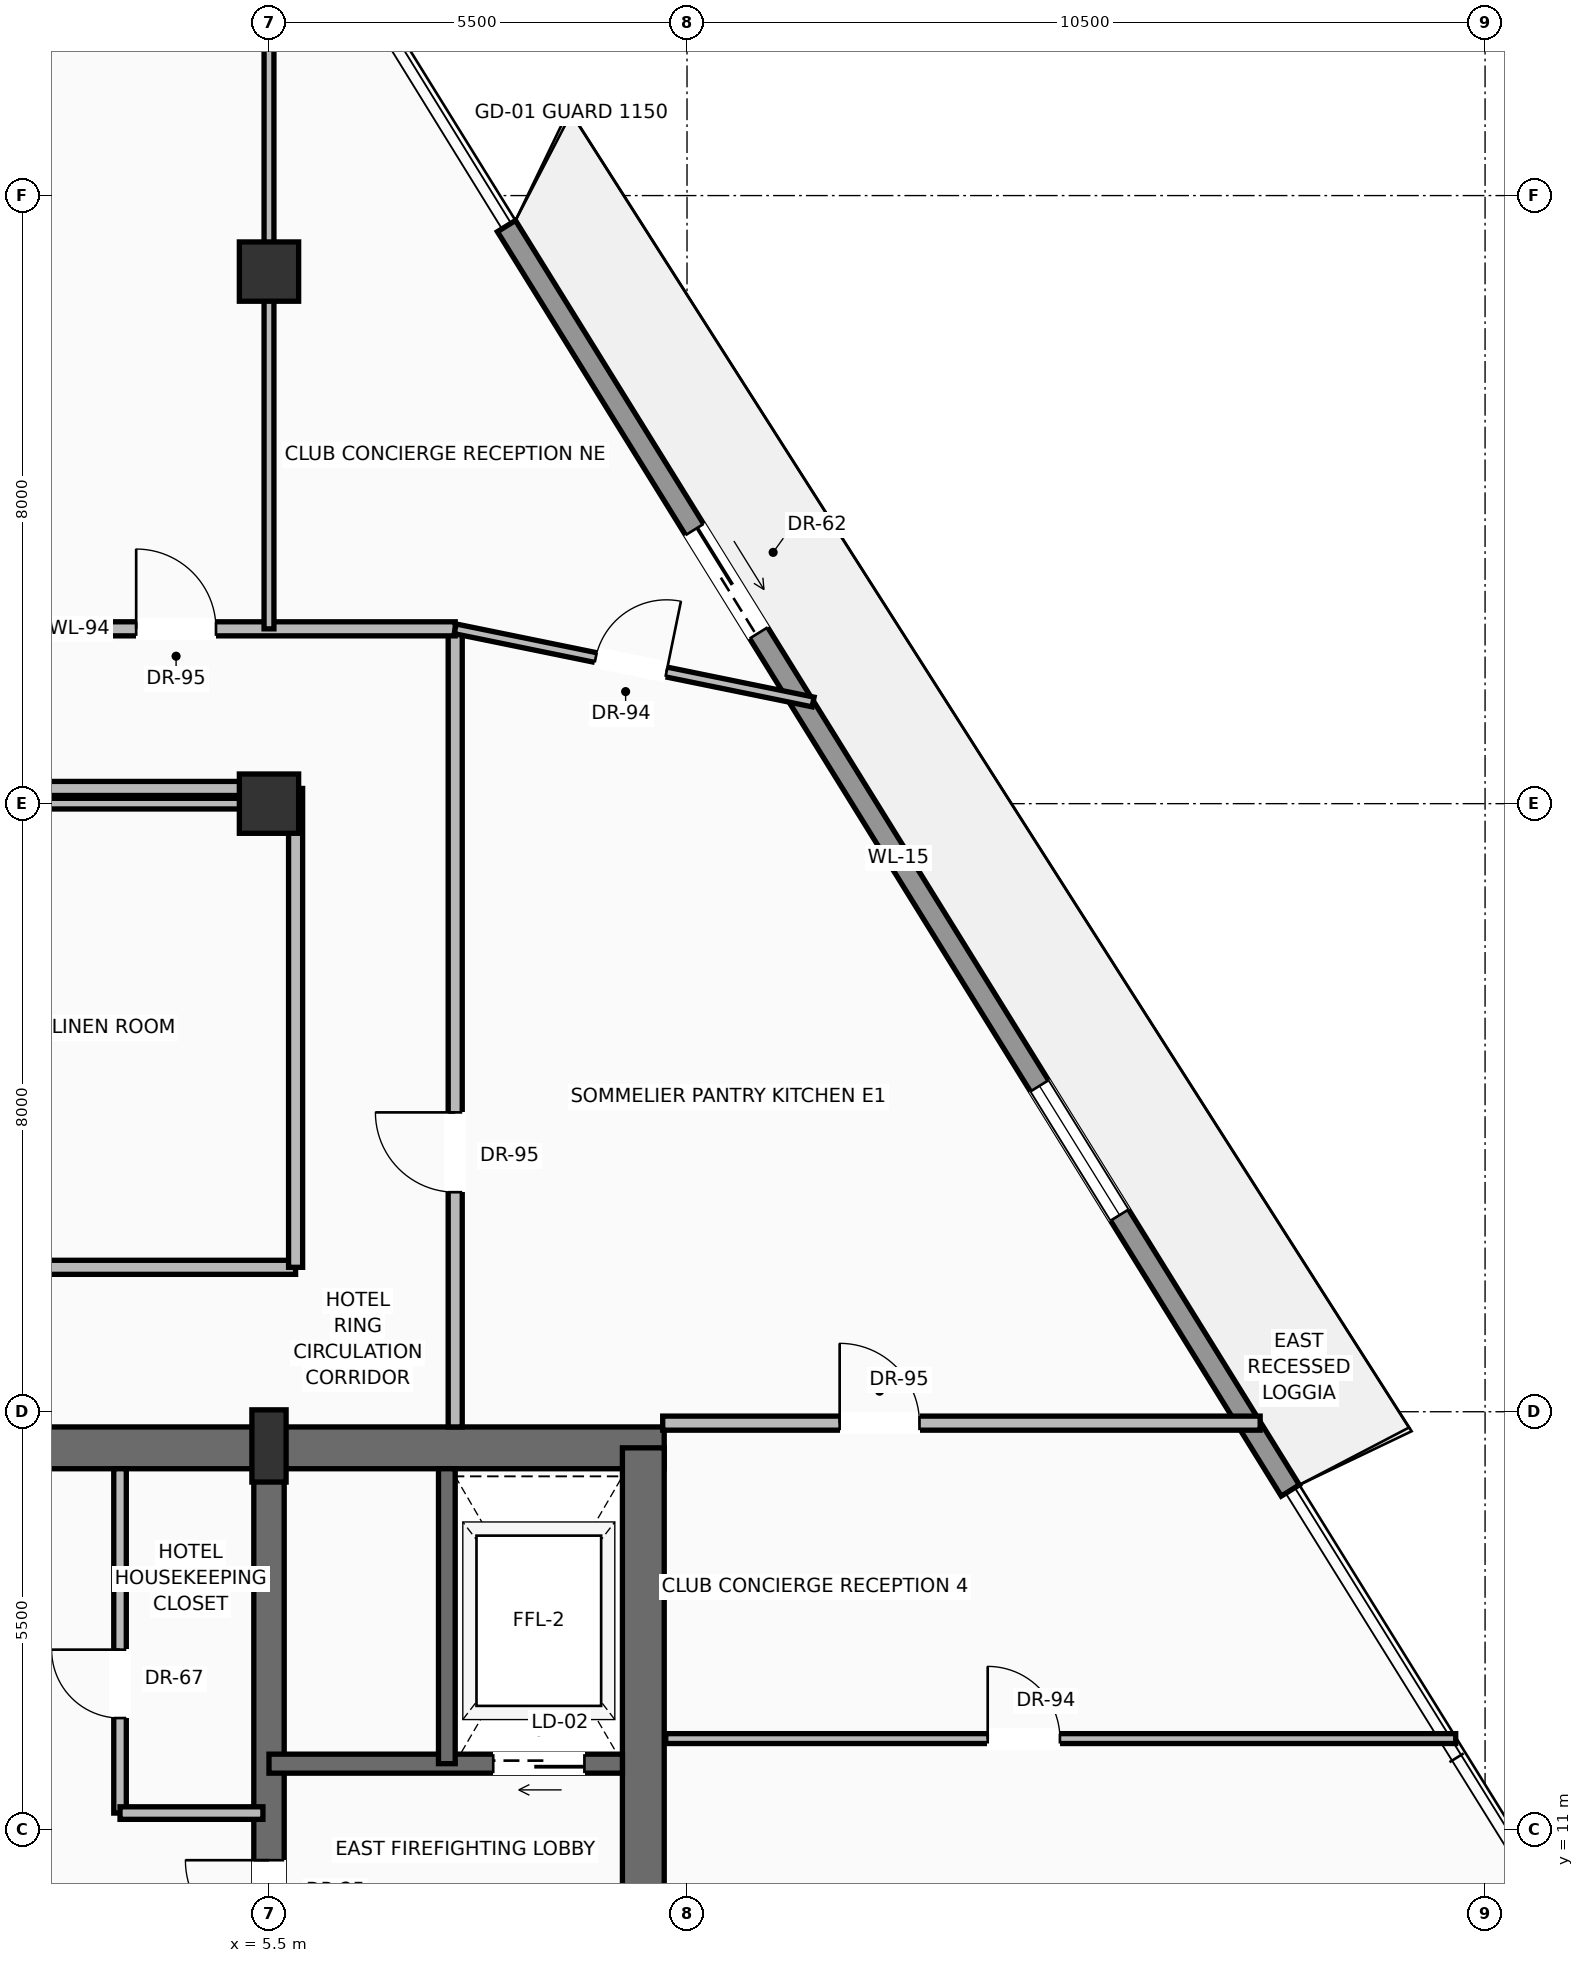
"""IFC4 building model, lengths in metres.
Left out: names, types, materials, properties, quantities, classifications, styles, units other than length and angle.
Written with IfcOpenShell. Run it as: python <this file> out.ifc"""

import sys

from ifc_helpers import new_model, si_unit, direction, frame, frame_2d, origin, origin_2d, place, context, subcontext, project, spatial, rectangle, extrude, source, transform, mapped, element, fill, save


model = new_model("IFC4")
c1 = context("Model", 3, precision=1e-05, world=origin(), true_north=direction((0.0, 1.0)))
c2 = subcontext(c1, "Body", "Model", "MODEL_VIEW")
j1 = project(units=[si_unit("LENGTHUNIT", "METRE"), si_unit("PLANEANGLEUNIT", "RADIAN")], contexts=[c1])
p1 = place(None, origin())
s1 = spatial("IfcSite", under=j1, at=p1, CompositionType="ELEMENT")
p2 = place(p1, origin())
s2 = spatial("IfcBuilding", under=s1, at=p2, CompositionType="ELEMENT")
p3 = place(p2, frame((0.0, 0.0, 233.8)))
s3 = spatial("IfcBuildingStorey", under=s2, at=p3, CompositionType="ELEMENT", Elevation=233.8)
p4 = place(p3, frame((-10.7, 16.025, 0.0), z_axis=(0.0, 0.0, 1.0), x_axis=(1.0, 0.0, 0.0)))
e1 = element("IfcWall", 1, at=p4, inside=s3, PredefinedType="SHEAR", context=c2, shape_type="SweptSolid", body=[
    extrude(rectangle(XDim=21.4, YDim=0.55, at=frame_2d((10.7, 0.0))), origin(), (0.0, 0.0, 1.0), 3.24),
])
p5 = place(p4, frame((3.27, 0.0, 0.0)))
e2 = element("IfcOpeningElement", 2, at=p5, cuts=e1, PredefinedType="OPENING", context=c2, shape_type="SweptSolid", body=[
    extrude(rectangle(XDim=1.3, YDim=2.3, at=frame_2d((0.65, 1.15))), frame((0.0, 0.285, 0.0), z_axis=(0.0, -1.0, 0.0), x_axis=(1.0, 0.0, 0.0)), (0.0, 0.0, 1.0), 0.57),
])
p6 = place(p4, frame((9.7, 0.0, 0.0)))
e3 = element("IfcOpeningElement", 3, at=p6, cuts=e1, PredefinedType="OPENING", context=c2, shape_type="SweptSolid", body=[
    extrude(rectangle(XDim=2.0, YDim=2.4, at=frame_2d((1.0, 1.2))), frame((0.0, 0.285, 0.0), z_axis=(0.0, -1.0, 0.0), x_axis=(1.0, 0.0, 0.0)), (0.0, 0.0, 1.0), 0.57),
])
p7 = place(p3, frame((10.425, 0.575, 0.0), z_axis=(0.0, 0.0, 1.0), x_axis=(0.0, 1.0, 0.0)))
e4 = element("IfcWall", 4, at=p7, inside=s3, PredefinedType="SHEAR", context=c2, shape_type="SweptSolid", body=[
    extrude(rectangle(XDim=15.45, YDim=0.55, at=frame_2d((7.725, 0.0))), origin(), (0.0, 0.0, 1.0), 3.24),
])
p8 = place(p3, frame((5.5, 0.575, 0.0), z_axis=(0.0, 0.0, 1.0), x_axis=(0.0, 1.0, 0.0)))
e5 = element("IfcWall", 5, at=p8, inside=s3, PredefinedType="SHEAR", context=c2, shape_type="SweptSolid", body=[
    extrude(rectangle(XDim=15.45, YDim=0.4, at=frame_2d((7.725, 0.0))), origin(), (0.0, 0.0, 1.0), 3.24),
])
p9 = place(p8, frame((8.925, 0.0, 0.0)))
e6 = element("IfcOpeningElement", 6, at=p9, cuts=e5, PredefinedType="OPENING", context=c2, shape_type="SweptSolid", body=[
    extrude(rectangle(XDim=1.1, YDim=2.2, at=frame_2d((0.55, 1.1))), frame((0.0, 0.21, 0.0), z_axis=(0.0, -1.0, 0.0), x_axis=(1.0, 0.0, 0.0)), (0.0, 0.0, 1.0), 0.42),
])
m1 = source(origin(), c2, "Body", "SweptSolid", [
    extrude(rectangle(XDim=0.45, YDim=0.95, at=origin_2d()), origin(), (0.0, 0.0, 1.0), 3.45),
])
p10 = place(p3, frame((5.5, 16.05, 0.0), z_axis=(0.0, 0.0, 1.0), x_axis=(1.0, 0.0, 0.0)))
e7 = element("IfcColumn", 7, at=p10, inside=s3, PredefinedType="PILASTER", context=c2, shape_type="MappedRepresentation", body=[
    mapped(m1, transform((0.0, 0.0, 0.0), scale=1.0)),
])
m2 = source(origin(), c2, "Body", "SweptSolid", [
    extrude(rectangle(XDim=0.78, YDim=0.78, at=origin_2d()), origin(), (0.0, 0.0, 1.0), 3.45),
])
for number, where, z_axis, x_axis in (
    (8, (5.5, 24.5, 0.0), (0.0, 0.0, 1.0), (1.0, 0.0, 0.0)),
    (9, (5.5, 31.5, 0.0), (0.0, 0.0, 1.0), (1.0, 0.0, 0.0)),
):
    element("IfcColumn", number, at=place(p3, frame(where, z_axis=z_axis, x_axis=x_axis)), inside=s3, PredefinedType="COLUMN", context=c2, shape_type="MappedRepresentation", body=[
        mapped(m2, transform((0.0, 0.0, 0.0), scale=1.0)),
    ])
p11 = place(p3, frame((8.625, 32.099, 0.0), z_axis=(0.0, 0.0, 1.0), x_axis=(0.526909754256, -0.849921238039, 0.0)))
e10 = element("IfcWall", 10, at=p11, inside=s3, PredefinedType="SOLIDWALL", context=c2, shape_type="SweptSolid", body=[
    extrude(rectangle(XDim=19.572, YDim=0.28, at=frame_2d((9.786, 0.0))), origin(), (0.0, 0.0, 1.0), 2.82),
])
p12 = place(p11, frame((4.697, 0.0, 0.0)))
e11 = element("IfcOpeningElement", 11, at=p12, cuts=e10, PredefinedType="OPENING", context=c2, shape_type="SweptSolid", body=[
    extrude(rectangle(XDim=1.6, YDim=2.35, at=frame_2d((0.8, 1.175))), frame((0.0, 0.15, 0.0), z_axis=(0.0, -1.0, 0.0), x_axis=(1.0, 0.0, 0.0)), (0.0, 0.0, 1.0), 0.3),
])
p13 = place(p11, frame((13.309, 0.0, 0.9)))
e12 = element("IfcOpeningElement", 12, at=p13, cuts=e10, PredefinedType="OPENING", context=c2, shape_type="SweptSolid", body=[
    extrude(rectangle(XDim=2.0, YDim=1.75, at=frame_2d((1.0, 0.875))), frame((0.0, 0.15, 0.0), z_axis=(0.0, -1.0, 0.0), x_axis=(1.0, 0.0, 0.0)), (0.0, 0.0, 1.0), 0.3),
])
p14 = place(p3, frame((10.15, 11.87, 0.0), z_axis=(0.0, 0.0, 1.0), x_axis=(-1.0, 0.0, 0.0)))
e13 = element("IfcWall", 13, at=p14, inside=s3, PredefinedType="SOLIDWALL", context=c2, shape_type="SweptSolid", body=[
    extrude(rectangle(XDim=4.65, YDim=0.25, at=frame_2d((2.325, 0.0))), origin(), (0.0, 0.0, 1.0), 3.24),
])
p15 = place(p14, frame((0.5, 0.0, 0.0)))
e14 = element("IfcOpeningElement", 14, at=p15, cuts=e13, PredefinedType="OPENING", context=c2, shape_type="SweptSolid", body=[
    extrude(rectangle(XDim=1.2, YDim=2.25, at=frame_2d((0.6, 1.125))), frame((0.0, 0.135, 0.0), z_axis=(0.0, -1.0, 0.0), x_axis=(1.0, 0.0, 0.0)), (0.0, 0.0, 1.0), 0.27),
])
p16 = place(p3, frame((7.84, 11.87, 0.0), z_axis=(0.0, 0.0, 1.0), x_axis=(0.0, 1.0, 0.0)))
e15 = element("IfcWall", 15, at=p16, inside=s3, PredefinedType="SOLIDWALL", context=c2, shape_type="SweptSolid", body=[
    extrude(rectangle(XDim=3.88, YDim=0.22, at=frame_2d((1.94, 0.0))), origin(), (0.0, 0.0, 1.0), 3.24),
])
p17 = place(p3, frame((3.54, 11.22, 0.0), z_axis=(0.0, 0.0, 1.0), x_axis=(0.0, 1.0, 0.0)))
e16 = element("IfcWall", 16, at=p17, inside=s3, PredefinedType="PARTITIONING", context=c2, shape_type="SweptSolid", body=[
    extrude(rectangle(XDim=4.53, YDim=0.165, at=frame_2d((2.265, 0.0))), origin(), (0.0, 0.0, 1.0), 3.232),
])
p18 = place(p17, frame((1.25, 0.0, 0.0)))
e17 = element("IfcOpeningElement", 17, at=p18, cuts=e16, PredefinedType="OPENING", context=c2, shape_type="SweptSolid", body=[
    extrude(rectangle(XDim=0.9, YDim=2.1, at=frame_2d((0.45, 1.05))), frame((0.0, 0.093, 0.0), z_axis=(0.0, -1.0, 0.0), x_axis=(1.0, 0.0, 0.0)), (0.0, 0.0, 1.0), 0.185),
])
p19 = place(p3, frame((3.54, 11.22, 0.0), z_axis=(0.0, 0.0, 1.0), x_axis=(1.0, 0.0, 0.0)))
e18 = element("IfcWall", 18, at=p19, inside=s3, PredefinedType="PARTITIONING", context=c2, shape_type="SweptSolid", body=[
    extrude(rectangle(XDim=1.88, YDim=0.165, at=frame_2d((0.94, 0.0))), origin(), (0.0, 0.0, 1.0), 3.232),
])
p20 = place(p3, frame((-6.55, 18.4, 0.0), z_axis=(0.0, 0.0, 1.0), x_axis=(1.0, 0.0, 0.0)))
e19 = element("IfcWall", 19, at=p20, inside=s3, PredefinedType="PARTITIONING", context=c2, shape_type="SweptSolid", body=[
    extrude(rectangle(XDim=12.4, YDim=0.185, at=frame_2d((6.2, 0.0))), origin(), (0.0, 0.0, 1.0), 3.232),
])
p21 = place(p20, frame((5.725, 0.0, 0.0)))
e20 = element("IfcOpeningElement", 20, at=p21, cuts=e19, PredefinedType="OPENING", context=c2, shape_type="SweptSolid", body=[
    extrude(rectangle(XDim=0.95, YDim=2.2, at=frame_2d((0.475, 1.1))), frame((0.0, 0.103, 0.0), z_axis=(0.0, -1.0, 0.0), x_axis=(1.0, 0.0, 0.0)), (0.0, 0.0, 1.0), 0.205),
])
p22 = place(p3, frame((-6.55, 24.7, 0.0), z_axis=(0.0, 0.0, 1.0), x_axis=(1.0, 0.0, 0.0)))
e21 = element("IfcWall", 21, at=p22, inside=s3, PredefinedType="PARTITIONING", context=c2, shape_type="SweptSolid", body=[
    extrude(rectangle(XDim=12.4, YDim=0.185, at=frame_2d((6.2, 0.0))), origin(), (0.0, 0.0, 1.0), 2.683),
])
p23 = place(p3, frame((5.85, 18.4, 0.0), z_axis=(0.0, 0.0, 1.0), x_axis=(0.0, 1.0, 0.0)))
e22 = element("IfcWall", 22, at=p23, inside=s3, PredefinedType="PARTITIONING", context=c2, shape_type="SweptSolid", body=[
    extrude(rectangle(XDim=6.3, YDim=0.185, at=frame_2d((3.15, 0.0))), origin(), (0.0, 0.0, 1.0), 3.232),
])
p24 = place(p3, frame((7.95, 16.3, 0.0), z_axis=(0.0, 0.0, 1.0), x_axis=(0.0, 1.0, 0.0)))
e23 = element("IfcWall", 23, at=p24, inside=s3, PredefinedType="PARTITIONING", context=c2, shape_type="SweptSolid", body=[
    extrude(rectangle(XDim=10.5, YDim=0.185, at=frame_2d((5.25, 0.0))), origin(), (0.0, 0.0, 1.0), 3.232),
])
p25 = place(p24, frame((3.088, 0.0, 0.0)))
e24 = element("IfcOpeningElement", 24, at=p25, cuts=e23, PredefinedType="OPENING", context=c2, shape_type="SweptSolid", body=[
    extrude(rectangle(XDim=1.05, YDim=2.25, at=frame_2d((0.525, 1.125))), frame((0.0, 0.103, 0.0), z_axis=(0.0, -1.0, 0.0), x_axis=(1.0, 0.0, 0.0)), (0.0, 0.0, 1.0), 0.205),
])
p26 = place(p3, frame((-8.65, 26.8, 0.0), z_axis=(0.0, 0.0, 1.0), x_axis=(1.0, 0.0, 0.0)))
e25 = element("IfcWall", 25, at=p26, inside=s3, PredefinedType="PARTITIONING", context=c2, shape_type="SweptSolid", body=[
    extrude(rectangle(XDim=16.6, YDim=0.185, at=frame_2d((8.3, 0.0))), origin(), (0.0, 0.0, 1.0), 3.232),
])
p27 = place(p26, frame((3.847, 0.0, 0.0)))
e26 = element("IfcOpeningElement", 26, at=p27, cuts=e25, PredefinedType="OPENING", context=c2, shape_type="SweptSolid", body=[
    extrude(rectangle(XDim=1.05, YDim=2.25, at=frame_2d((0.525, 1.125))), frame((0.0, 0.103, 0.0), z_axis=(0.0, -1.0, 0.0), x_axis=(1.0, 0.0, 0.0)), (0.0, 0.0, 1.0), 0.205),
])
p28 = place(p26, frame((6.903, 0.0, 0.0)))
e27 = element("IfcOpeningElement", 27, at=p28, cuts=e25, PredefinedType="OPENING", context=c2, shape_type="SweptSolid", body=[
    extrude(rectangle(XDim=1.05, YDim=2.25, at=frame_2d((0.525, 1.125))), frame((0.0, 0.103, 0.0), z_axis=(0.0, -1.0, 0.0), x_axis=(1.0, 0.0, 0.0)), (0.0, 0.0, 1.0), 0.205),
])
p29 = place(p26, frame((12.403, 0.0, 0.0)))
e28 = element("IfcOpeningElement", 28, at=p29, cuts=e25, PredefinedType="OPENING", context=c2, shape_type="SweptSolid", body=[
    extrude(rectangle(XDim=1.05, YDim=2.25, at=frame_2d((0.525, 1.125))), frame((0.0, 0.103, 0.0), z_axis=(0.0, -1.0, 0.0), x_axis=(1.0, 0.0, 0.0)), (0.0, 0.0, 1.0), 0.205),
])
p30 = place(p26, frame((1.403, 0.0, 0.0)))
e29 = element("IfcOpeningElement", 29, at=p30, cuts=e25, PredefinedType="OPENING", context=c2, shape_type="SweptSolid", body=[
    extrude(rectangle(XDim=1.05, YDim=2.25, at=frame_2d((0.525, 1.125))), frame((0.0, 0.103, 0.0), z_axis=(0.0, -1.0, 0.0), x_axis=(1.0, 0.0, 0.0)), (0.0, 0.0, 1.0), 0.205),
])
p31 = place(p3, frame((-6.55, 24.5, 0.0), z_axis=(0.0, 0.0, 1.0), x_axis=(1.0, 0.0, 0.0)))
e30 = element("IfcWall", 30, at=p31, inside=s3, PredefinedType="PARTITIONING", context=c2, shape_type="SweptSolid", body=[
    extrude(rectangle(XDim=12.4, YDim=0.14, at=frame_2d((6.2, 0.0))), origin(), (0.0, 0.0, 1.0), 2.683),
])
p32 = place(p3, frame((10.68, 16.35, 0.0), z_axis=(0.0, 0.0, 1.0), x_axis=(1.0, 0.0, 0.0)))
e31 = element("IfcWall", 31, at=p32, inside=s3, PredefinedType="PARTITIONING", context=c2, shape_type="SweptSolid", body=[
    extrude(rectangle(XDim=7.861, YDim=0.185, at=frame_2d((3.93, 0.0))), origin(), (0.0, 0.0, 1.0), 3.232),
])
p33 = place(p32, frame((2.328, 0.0, 0.0)))
e32 = element("IfcOpeningElement", 32, at=p33, cuts=e31, PredefinedType="OPENING", context=c2, shape_type="SweptSolid", body=[
    extrude(rectangle(XDim=1.05, YDim=2.25, at=frame_2d((0.525, 1.125))), frame((0.0, 0.103, 0.0), z_axis=(0.0, -1.0, 0.0), x_axis=(1.0, 0.0, 0.0)), (0.0, 0.0, 1.0), 0.205),
])
p34 = place(p3, frame((7.95, 26.8, 0.0), z_axis=(0.0, 0.0, 1.0), x_axis=(0.979737591197, -0.200285427317, 0.0)))
e33 = element("IfcWall", 33, at=p34, inside=s3, PredefinedType="PARTITIONING", context=c2, shape_type="SweptSolid", body=[
    extrude(rectangle(XDim=4.806, YDim=0.13, at=frame_2d((2.403, 0.0))), origin(), (0.0, 0.0, 1.0), 3.232),
])
p35 = place(p34, frame((1.887, 0.0, 0.0)))
e34 = element("IfcOpeningElement", 34, at=p35, cuts=e33, PredefinedType="OPENING", context=c2, shape_type="SweptSolid", body=[
    extrude(rectangle(XDim=0.95, YDim=2.2, at=frame_2d((0.475, 1.1))), frame((0.0, 0.075, 0.0), z_axis=(0.0, -1.0, 0.0), x_axis=(1.0, 0.0, 0.0)), (0.0, 0.0, 1.0), 0.15),
])
p36 = place(p3, frame((5.5, 26.8, 0.0), z_axis=(0.0, 0.0, 1.0), x_axis=(0.0, 1.0, 0.0)))
e35 = element("IfcWall", 35, at=p36, inside=s3, PredefinedType="PARTITIONING", context=c2, shape_type="SweptSolid", body=[
    extrude(rectangle(XDim=10.585, YDim=0.13, at=frame_2d((5.292, 0.0))), origin(), (0.0, 0.0, 1.0), 2.683),
])
p37 = place(p3, frame((10.72, 12.2, 0.0), z_axis=(0.0, 0.0, 1.0), x_axis=(1.0, 0.0, 0.0)))
e36 = element("IfcWall", 36, at=p37, inside=s3, PredefinedType="PARTITIONING", context=c2, shape_type="SweptSolid", body=[
    extrude(rectangle(XDim=10.394, YDim=0.13, at=frame_2d((5.197, 0.0))), origin(), (0.0, 0.0, 1.0), 3.232),
])
p38 = place(p37, frame((4.236, 0.0, 0.0)))
e37 = element("IfcOpeningElement", 37, at=p38, cuts=e36, PredefinedType="OPENING", context=c2, shape_type="SweptSolid", body=[
    extrude(rectangle(XDim=0.95, YDim=2.2, at=frame_2d((0.475, 1.1))), frame((0.0, 0.075, 0.0), z_axis=(0.0, -1.0, 0.0), x_axis=(1.0, 0.0, 0.0)), (0.0, 0.0, 1.0), 0.15),
])
m3 = source(origin(), c2, "Body", "SweptSolid", [
    extrude(rectangle(XDim=1.6, YDim=2.35, at=frame_2d((0.8, 1.175))), frame((0.0, 0.025, 0.0), z_axis=(0.0, -1.0, 0.0), x_axis=(1.0, 0.0, 0.0)), (0.0, 0.0, 1.0), 0.05),
])
p39 = place(p12, origin())
e38 = element("IfcDoor", 38, at=p39, inside=s3, OperationType="SLIDING_TO_RIGHT", PredefinedType="DOOR", context=c2, shape_type="MappedRepresentation", body=[
    mapped(m3, transform((0.0, 0.0, 0.0), scale=1.0)),
])
fill(e11, e38)
m4 = source(origin(), c2, "Body", "SweptSolid", [
    extrude(rectangle(XDim=2.0, YDim=1.75, at=frame_2d((1.0, 0.875))), frame((0.0, 0.03, 0.0), z_axis=(0.0, -1.0, 0.0), x_axis=(1.0, 0.0, 0.0)), (0.0, 0.0, 1.0), 0.06),
])
p40 = place(p13, origin())
e39 = element("IfcWindow", 39, at=p40, inside=s3, PartitioningType="SINGLE_PANEL", PredefinedType="WINDOW", context=c2, shape_type="MappedRepresentation", body=[
    mapped(m4, transform((0.0, 0.0, 0.0), scale=1.0)),
])
fill(e12, e39)
m5 = source(origin(), c2, "Body", "SweptSolid", [
    extrude(rectangle(XDim=1.1, YDim=2.2, at=frame_2d((0.55, 1.1))), frame((0.0, 0.025, 0.0), z_axis=(0.0, -1.0, 0.0), x_axis=(1.0, 0.0, 0.0)), (0.0, 0.0, 1.0), 0.05),
])
p41 = place(p9, origin())
e40 = element("IfcDoor", 40, at=p41, inside=s3, OperationType="SINGLE_SWING_RIGHT", PredefinedType="DOOR", context=c2, shape_type="MappedRepresentation", body=[
    mapped(m5, transform((0.0, 0.0, 0.0), scale=1.0)),
])
fill(e6, e40)
m6 = source(origin(), c2, "Body", "SweptSolid", [
    extrude(rectangle(XDim=1.2, YDim=2.25, at=frame_2d((0.6, 1.125))), frame((0.0, 0.025, 0.0), z_axis=(0.0, -1.0, 0.0), x_axis=(1.0, 0.0, 0.0)), (0.0, 0.0, 1.0), 0.05),
])
p42 = place(p15, origin())
e41 = element("IfcDoor", 41, at=p42, inside=s3, OperationType="SLIDING_TO_RIGHT", PredefinedType="DOOR", context=c2, shape_type="MappedRepresentation", body=[
    mapped(m6, transform((0.0, 0.0, 0.0), scale=1.0)),
])
fill(e14, e41)
m7 = source(origin(), c2, "Body", "SweptSolid", [
    extrude(rectangle(XDim=0.9, YDim=2.1, at=frame_2d((0.45, 1.05))), frame((0.0, 0.025, 0.0), z_axis=(0.0, -1.0, 0.0), x_axis=(1.0, 0.0, 0.0)), (0.0, 0.0, 1.0), 0.05),
])
p43 = place(p18, origin())
e42 = element("IfcDoor", 42, at=p43, inside=s3, OperationType="SINGLE_SWING_RIGHT", PredefinedType="DOOR", context=c2, shape_type="MappedRepresentation", body=[
    mapped(m7, transform((0.0, 0.0, 0.0), scale=1.0)),
])
fill(e17, e42)
m8 = source(origin(), c2, "Body", "SweptSolid", [
    extrude(rectangle(XDim=1.05, YDim=2.25, at=frame_2d((0.525, 1.125))), frame((0.0, 0.025, 0.0), z_axis=(0.0, -1.0, 0.0), x_axis=(1.0, 0.0, 0.0)), (0.0, 0.0, 1.0), 0.05),
])
p44 = place(p33, origin())
e43 = element("IfcDoor", 43, at=p44, inside=s3, OperationType="SINGLE_SWING_LEFT", PredefinedType="DOOR", context=c2, shape_type="MappedRepresentation", body=[
    mapped(m8, transform((0.0, 0.0, 0.0), scale=1.0)),
])
fill(e32, e43)
m9 = source(origin(), c2, "Body", "SweptSolid", [
    extrude(rectangle(XDim=0.95, YDim=2.2, at=frame_2d((0.475, 1.1))), frame((0.0, 0.025, 0.0), z_axis=(0.0, -1.0, 0.0), x_axis=(1.0, 0.0, 0.0)), (0.0, 0.0, 1.0), 0.05),
])
p45 = place(p38, origin())
e44 = element("IfcDoor", 44, at=p45, inside=s3, OperationType="SINGLE_SWING_LEFT", PredefinedType="DOOR", context=c2, shape_type="MappedRepresentation", body=[
    mapped(m9, transform((0.0, 0.0, 0.0), scale=1.0)),
])
fill(e37, e44)
p46 = place(p25, origin())
e45 = element("IfcDoor", 45, at=p46, inside=s3, OperationType="SINGLE_SWING_RIGHT", PredefinedType="DOOR", context=c2, shape_type="MappedRepresentation", body=[
    mapped(m8, transform((0.0, 0.0, 0.0), scale=1.0)),
])
fill(e24, e45)
p47 = place(p29, origin())
e46 = element("IfcDoor", 46, at=p47, inside=s3, OperationType="SINGLE_SWING_LEFT", PredefinedType="DOOR", context=c2, shape_type="MappedRepresentation", body=[
    mapped(m8, transform((0.0, 0.0, 0.0), scale=1.0)),
])
fill(e28, e46)
p48 = place(p35, origin())
e47 = element("IfcDoor", 47, at=p48, inside=s3, OperationType="SINGLE_SWING_RIGHT", PredefinedType="DOOR", context=c2, shape_type="MappedRepresentation", body=[
    mapped(m9, transform((0.0, 0.0, 0.0), scale=1.0)),
])
fill(e34, e47)
save(model, sys.argv[1])
